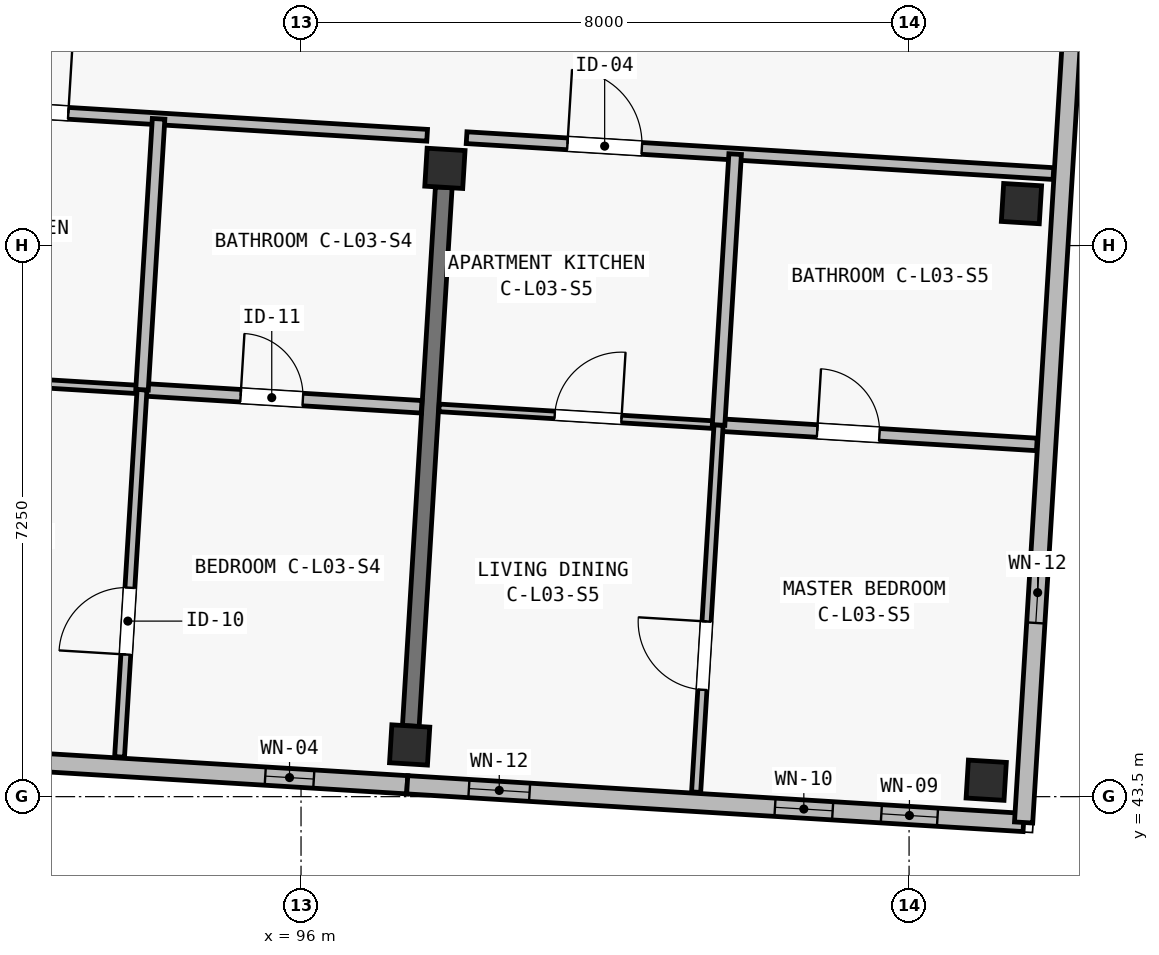
"""IFC4 building model, lengths in metres.
Left out: names, types, materials, properties, quantities, classifications, styles, units other than length and angle.
Written with IfcOpenShell. Run it as: python <this file> out.ifc"""

import sys

from ifc_helpers import new_model, si_unit, direction, frame, frame_2d, origin, origin_2d, place, context, subcontext, project, spatial, rectangle, extrude, element, fill, save


model = new_model("IFC4")
c1 = context("Model", 3, precision=1e-05, world=origin(), true_north=direction((0.0, 1.0)))
c2 = subcontext(c1, "Body", "Model", "MODEL_VIEW")
j1 = project(units=[si_unit("LENGTHUNIT", "METRE"), si_unit("PLANEANGLEUNIT", "RADIAN")], contexts=[c1])
p1 = place(None, origin())
s1 = spatial("IfcSite", under=j1, at=p1, CompositionType="ELEMENT")
p2 = place(p1, origin())
s2 = spatial("IfcBuilding", under=s1, at=p2, CompositionType="ELEMENT")
p3 = place(p2, frame((0.0, 0.0, 11.65)))
s3 = spatial("IfcBuildingStorey", under=s2, at=p3, CompositionType="ELEMENT", Elevation=11.65)
for number, where, z_axis, x_axis in (
    (1, (97.429, 44.18, 0.0), (0.0, 0.0, 1.0), (0.998, -0.061, 0.0)),
    (2, (97.893, 51.766, 0.0), (0.0, 0.0, 1.0), (0.998, -0.061, 0.0)),
    (3, (105.015, 43.716, 0.0), (0.0, 0.0, 1.0), (0.998, -0.061, 0.0)),
    (4, (105.479, 51.302, 0.0), (0.0, 0.0, 1.0), (0.998, -0.061, 0.0)),
):
    element("IfcColumn", number, at=place(p3, frame(where, z_axis=z_axis, x_axis=x_axis)), inside=s3, PredefinedType="COLUMN", context=c2, shape_type="SweptSolid", body=[
        extrude(rectangle(XDim=0.5, YDim=0.5, at=origin_2d()), origin(), (0.0, 0.0, 1.0), 3.25),
    ])
p4 = place(p3, frame((97.444, 44.43, 0.0), z_axis=(0.0, 0.0, 1.0), x_axis=(0.061070212127, 0.998133472633, 0.0)))
e5 = element("IfcWall", 5, at=p4, inside=s3, PredefinedType="SHEAR", context=c2, shape_type="SweptSolid", body=[
    extrude(rectangle(XDim=7.1, YDim=0.22, at=frame_2d((3.55, 0.0))), origin(), (0.0, 0.0, 1.0), 2.5),
])
p5 = place(p3, frame((97.397, 43.656, 0.0), z_axis=(0.0, 0.0, 1.0), x_axis=(-0.998135549572, 0.061036257095, 0.0)))
e6 = element("IfcWall", 6, at=p5, inside=s3, PredefinedType="SOLIDWALL", context=c2, shape_type="SweptSolid", body=[
    extrude(rectangle(XDim=7.6, YDim=0.24, at=frame_2d((3.8, 0.0))), origin(), (0.0, 0.0, 1.0), 3.0),
])
p6 = place(p5, frame((1.231, 0.0, 0.48)))
e7 = element("IfcOpeningElement", 7, at=p6, cuts=e6, PredefinedType="OPENING", context=c2, shape_type="SweptSolid", body=[
    extrude(rectangle(XDim=0.64, YDim=2.18, at=frame_2d((0.32, 1.09))), frame((0.0, 0.135, 0.0), z_axis=(0.0, -1.0, 0.0), x_axis=(1.0, 0.0, 0.0)), (0.0, 0.0, 1.0), 0.27),
])
p7 = place(p5, frame((4.848, 0.0, 0.48)))
e8 = element("IfcOpeningElement", 8, at=p7, cuts=e6, PredefinedType="OPENING", context=c2, shape_type="SweptSolid", body=[
    extrude(rectangle(XDim=0.7, YDim=2.36, at=frame_2d((0.35, 1.18))), frame((0.0, 0.135, 0.0), z_axis=(0.0, -1.0, 0.0), x_axis=(1.0, 0.0, 0.0)), (0.0, 0.0, 1.0), 0.27),
])
p8 = place(p5, frame((6.27, 0.0, 0.52)))
e9 = element("IfcOpeningElement", 9, at=p8, cuts=e6, PredefinedType="OPENING", context=c2, shape_type="SweptSolid", body=[
    extrude(rectangle(XDim=0.72, YDim=2.16, at=frame_2d((0.36, 1.08))), frame((0.0, 0.135, 0.0), z_axis=(0.0, -1.0, 0.0), x_axis=(1.0, 0.0, 0.0)), (0.0, 0.0, 1.0), 0.27),
])
p9 = place(p3, frame((105.507, 43.16, 0.0), z_axis=(0.0, 0.0, 1.0), x_axis=(-0.998134248939, 0.061057522844, 0.0)))
e10 = element("IfcWall", 10, at=p9, inside=s3, PredefinedType="SOLIDWALL", context=c2, shape_type="SweptSolid", body=[
    extrude(rectangle(XDim=8.125, YDim=0.24, at=frame_2d((4.062, 0.0))), origin(), (0.0, 0.0, 1.0), 3.0),
])
p10 = place(p9, frame((1.135, 0.0, 0.52)))
e11 = element("IfcOpeningElement", 11, at=p10, cuts=e10, PredefinedType="OPENING", context=c2, shape_type="SweptSolid", body=[
    extrude(rectangle(XDim=0.74, YDim=2.26, at=frame_2d((0.37, 1.13))), frame((0.0, 0.135, 0.0), z_axis=(0.0, -1.0, 0.0), x_axis=(1.0, 0.0, 0.0)), (0.0, 0.0, 1.0), 0.27),
])
p11 = place(p9, frame((2.517, 0.0, 0.42)))
e12 = element("IfcOpeningElement", 12, at=p11, cuts=e10, PredefinedType="OPENING", context=c2, shape_type="SweptSolid", body=[
    extrude(rectangle(XDim=0.76, YDim=2.34, at=frame_2d((0.38, 1.17))), frame((0.0, 0.135, 0.0), z_axis=(0.0, -1.0, 0.0), x_axis=(1.0, 0.0, 0.0)), (0.0, 0.0, 1.0), 0.27),
])
p12 = place(p9, frame((6.512, 0.0, 0.52)))
e13 = element("IfcOpeningElement", 13, at=p12, cuts=e10, PredefinedType="OPENING", context=c2, shape_type="SweptSolid", body=[
    extrude(rectangle(XDim=0.8, YDim=2.3, at=frame_2d((0.4, 1.15))), frame((0.0, 0.135, 0.0), z_axis=(0.0, -1.0, 0.0), x_axis=(1.0, 0.0, 0.0)), (0.0, 0.0, 1.0), 0.27),
])
p13 = place(p3, frame((106.768, 63.771, 0.0), z_axis=(0.0, 0.0, 1.0), x_axis=(-0.061053332998, -0.99813450523, 0.0)))
e14 = element("IfcWall", 14, at=p13, inside=s3, PredefinedType="SOLIDWALL", context=c2, shape_type="SweptSolid", body=[
    extrude(rectangle(XDim=20.65, YDim=0.24, at=frame_2d((10.325, 0.0))), origin(), (0.0, 0.0, 1.0), 3.0),
])
p14 = place(p13, frame((2.99, 0.0, 0.52)))
e15 = element("IfcOpeningElement", 15, at=p14, cuts=e14, PredefinedType="OPENING", context=c2, shape_type="SweptSolid", body=[
    extrude(rectangle(XDim=0.66, YDim=2.32, at=frame_2d((0.33, 1.16))), frame((0.0, 0.135, 0.0), z_axis=(0.0, -1.0, 0.0), x_axis=(1.0, 0.0, 0.0)), (0.0, 0.0, 1.0), 0.27),
])
p15 = place(p13, frame((17.22, 0.0, 0.45)))
e16 = element("IfcOpeningElement", 16, at=p15, cuts=e14, PredefinedType="OPENING", context=c2, shape_type="SweptSolid", body=[
    extrude(rectangle(XDim=0.8, YDim=2.3, at=frame_2d((0.4, 1.15))), frame((0.0, 0.135, 0.0), z_axis=(0.0, -1.0, 0.0), x_axis=(1.0, 0.0, 0.0)), (0.0, 0.0, 1.0), 0.27),
])
p16 = place(p3, frame((90.593, 52.633, 0.0), z_axis=(0.0, 0.0, 1.0), x_axis=(0.998135538078, -0.061036445065, 0.0)))
e17 = element("IfcWall", 17, at=p16, inside=s3, PredefinedType="PARTITIONING", context=c2, shape_type="SweptSolid", body=[
    extrude(rectangle(XDim=7.08, YDim=0.155, at=frame_2d((3.54, 0.0))), origin(), (0.0, 0.0, 1.0), 2.97),
])
p17 = place(p16, frame((1.33, 0.0, 0.0)))
e18 = element("IfcOpeningElement", 18, at=p17, cuts=e17, PredefinedType="OPENING", context=c2, shape_type="SweptSolid", body=[
    extrude(rectangle(XDim=1.02, YDim=2.2, at=frame_2d((0.51, 1.1))), frame((0.0, 0.093, 0.0), z_axis=(0.0, -1.0, 0.0), x_axis=(1.0, 0.0, 0.0)), (0.0, 0.0, 1.0), 0.185),
])
p18 = place(p3, frame((90.23, 49.079, 0.0), z_axis=(0.0, 0.0, 1.0), x_axis=(0.998132682596, -0.061083123148, 0.0)))
e19 = element("IfcWall", 19, at=p18, inside=s3, PredefinedType="PARTITIONING", context=c2, shape_type="SweptSolid", body=[
    extrude(rectangle(XDim=3.685, YDim=0.11, at=frame_2d((1.843, 0.0))), origin(), (0.0, 0.0, 1.0), 2.97),
])
p19 = place(p18, frame((1.525, 0.0, 0.0)))
e20 = element("IfcOpeningElement", 20, at=p19, cuts=e19, PredefinedType="OPENING", context=c2, shape_type="SweptSolid", body=[
    extrude(rectangle(XDim=0.9, YDim=2.1, at=frame_2d((0.45, 1.05))), frame((0.0, 0.07, 0.0), z_axis=(0.0, -1.0, 0.0), x_axis=(1.0, 0.0, 0.0)), (0.0, 0.0, 1.0), 0.14),
])
p20 = place(p3, frame((93.908, 48.854, 0.0), z_axis=(0.0, 0.0, 1.0), x_axis=(0.998136472989, -0.061021154439, 0.0)))
e21 = element("IfcWall", 21, at=p20, inside=s3, PredefinedType="PLUMBINGWALL", context=c2, shape_type="SweptSolid", body=[
    extrude(rectangle(XDim=3.685, YDim=0.165, at=frame_2d((1.842, 0.0))), origin(), (0.0, 0.0, 1.0), 2.97),
])
p21 = place(p20, frame((1.3, 0.0, 0.0)))
e22 = element("IfcOpeningElement", 22, at=p21, cuts=e21, PredefinedType="OPENING", context=c2, shape_type="SweptSolid", body=[
    extrude(rectangle(XDim=0.82, YDim=2.08, at=frame_2d((0.41, 1.04))), frame((0.0, 0.097, 0.0), z_axis=(0.0, -1.0, 0.0), x_axis=(1.0, 0.0, 0.0)), (0.0, 0.0, 1.0), 0.195),
])
p22 = place(p3, frame((93.612, 44.023, 0.0), z_axis=(0.0, 0.0, 1.0), x_axis=(0.061087499584, 0.99813241476, 0.0)))
e23 = element("IfcWall", 23, at=p22, inside=s3, PredefinedType="PARTITIONING", context=c2, shape_type="SweptSolid", body=[
    extrude(rectangle(XDim=4.84, YDim=0.13, at=frame_2d((2.42, 0.0))), origin(), (0.0, 0.0, 1.0), 2.97),
])
p23 = place(p22, frame((1.35, 0.0, 0.0)))
e24 = element("IfcOpeningElement", 24, at=p23, cuts=e23, PredefinedType="OPENING", context=c2, shape_type="SweptSolid", body=[
    extrude(rectangle(XDim=0.88, YDim=2.1, at=frame_2d((0.44, 1.05))), frame((0.0, 0.08, 0.0), z_axis=(0.0, -1.0, 0.0), x_axis=(1.0, 0.0, 0.0)), (0.0, 0.0, 1.0), 0.16),
])
p24 = place(p3, frame((93.908, 48.854, 0.0), z_axis=(0.0, 0.0, 1.0), x_axis=(0.060998831939, 0.998137837426, 0.0)))
e25 = element("IfcWall", 25, at=p24, inside=s3, PredefinedType="PLUMBINGWALL", context=c2, shape_type="SweptSolid", body=[
    extrude(rectangle(XDim=3.57, YDim=0.165, at=frame_2d((1.785, 0.0))), origin(), (0.0, 0.0, 1.0), 2.97),
])
p25 = place(p3, frame((98.178, 52.169, 0.0), z_axis=(0.0, 0.0, 1.0), x_axis=(0.998133272394, -0.061073484761, 0.0)))
e26 = element("IfcWall", 26, at=p25, inside=s3, PredefinedType="PARTITIONING", context=c2, shape_type="SweptSolid", body=[
    extrude(rectangle(XDim=7.735, YDim=0.155, at=frame_2d((3.868, 0.0))), origin(), (0.0, 0.0, 1.0), 2.97),
])
p26 = place(p25, frame((1.33, 0.0, 0.0)))
e27 = element("IfcOpeningElement", 27, at=p26, cuts=e26, PredefinedType="OPENING", context=c2, shape_type="SweptSolid", body=[
    extrude(rectangle(XDim=0.98, YDim=2.15, at=frame_2d((0.49, 1.075))), frame((0.0, 0.093, 0.0), z_axis=(0.0, -1.0, 0.0), x_axis=(1.0, 0.0, 0.0)), (0.0, 0.0, 1.0), 0.185),
])
p27 = place(p3, frame((97.816, 48.615, 0.0), z_axis=(0.0, 0.0, 1.0), x_axis=(0.998136472989, -0.061021154439, 0.0)))
e28 = element("IfcWall", 28, at=p27, inside=s3, PredefinedType="PARTITIONING", context=c2, shape_type="SweptSolid", body=[
    extrude(rectangle(XDim=3.685, YDim=0.1, at=frame_2d((1.842, 0.0))), origin(), (0.0, 0.0, 1.0), 2.97),
])
p28 = place(p27, frame((1.525, 0.0, 0.0)))
e29 = element("IfcOpeningElement", 29, at=p28, cuts=e28, PredefinedType="OPENING", context=c2, shape_type="SweptSolid", body=[
    extrude(rectangle(XDim=0.88, YDim=2.1, at=frame_2d((0.44, 1.05))), frame((0.0, 0.065, 0.0), z_axis=(0.0, -1.0, 0.0), x_axis=(1.0, 0.0, 0.0)), (0.0, 0.0, 1.0), 0.13),
])
p29 = place(p3, frame((101.494, 48.39, 0.0), z_axis=(0.0, 0.0, 1.0), x_axis=(0.99813479877, -0.061048533841, 0.0)))
e30 = element("IfcWall", 30, at=p29, inside=s3, PredefinedType="PLUMBINGWALL", context=c2, shape_type="SweptSolid", body=[
    extrude(rectangle(XDim=4.195, YDim=0.165, at=frame_2d((2.098, 0.0))), origin(), (0.0, 0.0, 1.0), 2.97),
])
p30 = place(p29, frame((1.3, 0.0, 0.0)))
e31 = element("IfcOpeningElement", 31, at=p30, cuts=e30, PredefinedType="OPENING", context=c2, shape_type="SweptSolid", body=[
    extrude(rectangle(XDim=0.82, YDim=2.08, at=frame_2d((0.41, 1.04))), frame((0.0, 0.097, 0.0), z_axis=(0.0, -1.0, 0.0), x_axis=(1.0, 0.0, 0.0)), (0.0, 0.0, 1.0), 0.195),
])
p31 = place(p3, frame((101.198, 43.559, 0.0), z_axis=(0.0, 0.0, 1.0), x_axis=(0.061034170677, 0.998135677155, 0.0)))
e32 = element("IfcWall", 32, at=p31, inside=s3, PredefinedType="PARTITIONING", context=c2, shape_type="SweptSolid", body=[
    extrude(rectangle(XDim=4.84, YDim=0.12, at=frame_2d((2.42, 0.0))), origin(), (0.0, 0.0, 1.0), 2.97),
])
p32 = place(p31, frame((1.35, 0.0, 0.0)))
e33 = element("IfcOpeningElement", 33, at=p32, cuts=e32, PredefinedType="OPENING", context=c2, shape_type="SweptSolid", body=[
    extrude(rectangle(XDim=0.9, YDim=2.1, at=frame_2d((0.45, 1.05))), frame((0.0, 0.075, 0.0), z_axis=(0.0, -1.0, 0.0), x_axis=(1.0, 0.0, 0.0)), (0.0, 0.0, 1.0), 0.15),
])
p33 = place(p3, frame((101.494, 48.39, 0.0), z_axis=(0.0, 0.0, 1.0), x_axis=(0.061071129902, 0.998133416479, 0.0)))
e34 = element("IfcWall", 34, at=p33, inside=s3, PredefinedType="PLUMBINGWALL", context=c2, shape_type="SweptSolid", body=[
    extrude(rectangle(XDim=3.57, YDim=0.165, at=frame_2d((1.785, 0.0))), origin(), (0.0, 0.0, 1.0), 2.97),
])
p34 = place(p6, origin())
e35 = element("IfcWindow", 35, at=p34, inside=s3, PartitioningType="SINGLE_PANEL", PredefinedType="WINDOW", context=c2, shape_type="SweptSolid", body=[
    extrude(rectangle(XDim=0.64, YDim=2.18, at=frame_2d((0.32, 1.09))), frame((0.0, 0.03, 0.0), z_axis=(0.0, -1.0, 0.0), x_axis=(1.0, 0.0, 0.0)), (0.0, 0.0, 1.0), 0.06),
])
fill(e7, e35)
p35 = place(p10, origin())
e36 = element("IfcWindow", 36, at=p35, inside=s3, PartitioningType="SINGLE_PANEL", PredefinedType="WINDOW", context=c2, shape_type="SweptSolid", body=[
    extrude(rectangle(XDim=0.74, YDim=2.26, at=frame_2d((0.37, 1.13))), frame((0.0, 0.03, 0.0), z_axis=(0.0, -1.0, 0.0), x_axis=(1.0, 0.0, 0.0)), (0.0, 0.0, 1.0), 0.06),
])
fill(e11, e36)
p36 = place(p11, origin())
e37 = element("IfcWindow", 37, at=p36, inside=s3, PartitioningType="SINGLE_PANEL", PredefinedType="WINDOW", context=c2, shape_type="SweptSolid", body=[
    extrude(rectangle(XDim=0.76, YDim=2.34, at=frame_2d((0.38, 1.17))), frame((0.0, 0.03, 0.0), z_axis=(0.0, -1.0, 0.0), x_axis=(1.0, 0.0, 0.0)), (0.0, 0.0, 1.0), 0.06),
])
fill(e12, e37)
p37 = place(p12, origin())
e38 = element("IfcWindow", 38, at=p37, inside=s3, PartitioningType="SINGLE_PANEL", PredefinedType="WINDOW", context=c2, shape_type="SweptSolid", body=[
    extrude(rectangle(XDim=0.8, YDim=2.3, at=frame_2d((0.4, 1.15))), frame((0.0, 0.03, 0.0), z_axis=(0.0, -1.0, 0.0), x_axis=(1.0, 0.0, 0.0)), (0.0, 0.0, 1.0), 0.06),
])
fill(e13, e38)
p38 = place(p15, origin())
e39 = element("IfcWindow", 39, at=p38, inside=s3, PartitioningType="SINGLE_PANEL", PredefinedType="WINDOW", context=c2, shape_type="SweptSolid", body=[
    extrude(rectangle(XDim=0.8, YDim=2.3, at=frame_2d((0.4, 1.15))), frame((0.0, 0.03, 0.0), z_axis=(0.0, -1.0, 0.0), x_axis=(1.0, 0.0, 0.0)), (0.0, 0.0, 1.0), 0.06),
])
fill(e16, e39)
p39 = place(p17, origin())
e40 = element("IfcDoor", 40, at=p39, inside=s3, OperationType="SINGLE_SWING_RIGHT", PredefinedType="DOOR", context=c2, shape_type="SweptSolid", body=[
    extrude(rectangle(XDim=1.02, YDim=2.2, at=frame_2d((0.51, 1.1))), frame((0.0, 0.025, 0.0), z_axis=(0.0, -1.0, 0.0), x_axis=(1.0, 0.0, 0.0)), (0.0, 0.0, 1.0), 0.05),
])
fill(e18, e40)
p40 = place(p21, origin())
e41 = element("IfcDoor", 41, at=p40, inside=s3, OperationType="SINGLE_SWING_LEFT", PredefinedType="DOOR", context=c2, shape_type="SweptSolid", body=[
    extrude(rectangle(XDim=0.82, YDim=2.08, at=frame_2d((0.41, 1.04))), frame((0.0, 0.025, 0.0), z_axis=(0.0, -1.0, 0.0), x_axis=(1.0, 0.0, 0.0)), (0.0, 0.0, 1.0), 0.05),
])
fill(e22, e41)
p41 = place(p23, origin())
e42 = element("IfcDoor", 42, at=p41, inside=s3, OperationType="SINGLE_SWING_LEFT", PredefinedType="DOOR", context=c2, shape_type="SweptSolid", body=[
    extrude(rectangle(XDim=0.88, YDim=2.1, at=frame_2d((0.44, 1.05))), frame((0.0, 0.025, 0.0), z_axis=(0.0, -1.0, 0.0), x_axis=(1.0, 0.0, 0.0)), (0.0, 0.0, 1.0), 0.05),
])
fill(e24, e42)
p42 = place(p26, origin())
e43 = element("IfcDoor", 43, at=p42, inside=s3, OperationType="SINGLE_SWING_LEFT", PredefinedType="DOOR", context=c2, shape_type="SweptSolid", body=[
    extrude(rectangle(XDim=0.98, YDim=2.15, at=frame_2d((0.49, 1.075))), frame((0.0, 0.025, 0.0), z_axis=(0.0, -1.0, 0.0), x_axis=(1.0, 0.0, 0.0)), (0.0, 0.0, 1.0), 0.05),
])
fill(e27, e43)
p43 = place(p28, origin())
e44 = element("IfcDoor", 44, at=p43, inside=s3, OperationType="SINGLE_SWING_RIGHT", PredefinedType="DOOR", context=c2, shape_type="SweptSolid", body=[
    extrude(rectangle(XDim=0.88, YDim=2.1, at=frame_2d((0.44, 1.05))), frame((0.0, 0.025, 0.0), z_axis=(0.0, -1.0, 0.0), x_axis=(1.0, 0.0, 0.0)), (0.0, 0.0, 1.0), 0.05),
])
fill(e29, e44)
p44 = place(p30, origin())
e45 = element("IfcDoor", 45, at=p44, inside=s3, OperationType="SINGLE_SWING_LEFT", PredefinedType="DOOR", context=c2, shape_type="SweptSolid", body=[
    extrude(rectangle(XDim=0.82, YDim=2.08, at=frame_2d((0.41, 1.04))), frame((0.0, 0.025, 0.0), z_axis=(0.0, -1.0, 0.0), x_axis=(1.0, 0.0, 0.0)), (0.0, 0.0, 1.0), 0.05),
])
fill(e31, e45)
p45 = place(p32, origin())
e46 = element("IfcDoor", 46, at=p45, inside=s3, OperationType="SINGLE_SWING_RIGHT", PredefinedType="DOOR", context=c2, shape_type="SweptSolid", body=[
    extrude(rectangle(XDim=0.9, YDim=2.1, at=frame_2d((0.45, 1.05))), frame((0.0, 0.025, 0.0), z_axis=(0.0, -1.0, 0.0), x_axis=(1.0, 0.0, 0.0)), (0.0, 0.0, 1.0), 0.05),
])
fill(e33, e46)
save(model, sys.argv[1])
